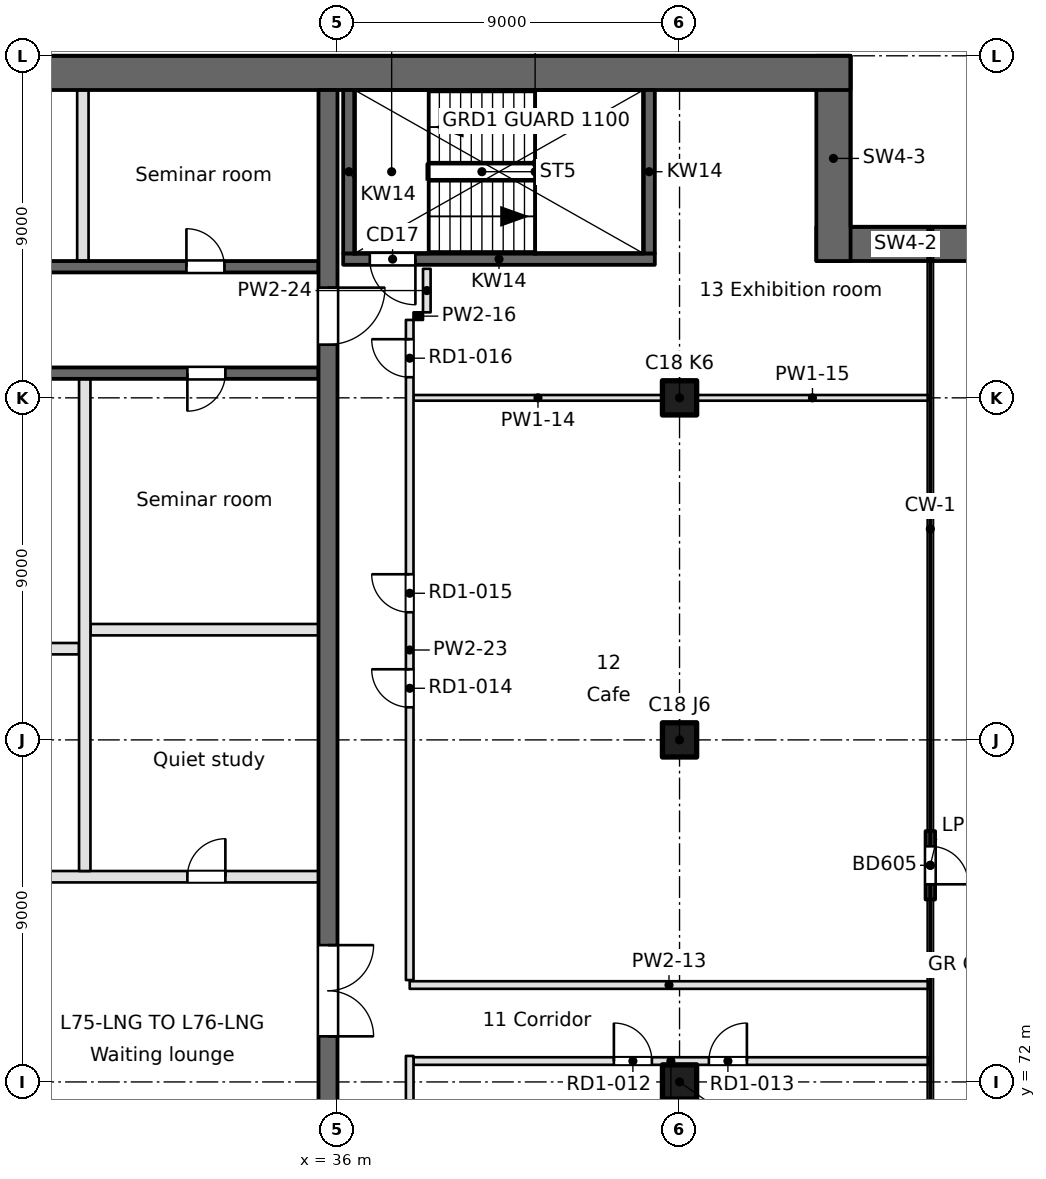
"""IFC4 building model, lengths in metres.
Left out: names, types, materials, properties, quantities, classifications, styles, units other than length and angle.
Written with IfcOpenShell. Run it as: python <this file> out.ifc"""

import sys

from ifc_helpers import new_model, si_unit, direction, frame, frame_2d, origin, origin_2d, place, context, subcontext, project, spatial, rectangle, extrude, element, fill, save


model = new_model("IFC4")
c1 = context("Model", 3, precision=1e-05, world=origin(), true_north=direction((0.0, 1.0)))
c2 = subcontext(c1, "Body", "Model", "MODEL_VIEW")
j1 = project(units=[si_unit("LENGTHUNIT", "METRE"), si_unit("PLANEANGLEUNIT", "RADIAN")], contexts=[c1])
p1 = place(None, origin())
s1 = spatial("IfcSite", under=j1, at=p1, CompositionType="ELEMENT")
p2 = place(p1, origin())
s2 = spatial("IfcBuilding", under=s1, at=p2, CompositionType="ELEMENT")
p3 = place(p2, frame((0.0, 0.0, 291.9)))
s3 = spatial("IfcBuildingStorey", under=s2, at=p3, CompositionType="ELEMENT", Elevation=291.9)
for number, where, z_axis, x_axis in (
    (1, (45.0, 72.0, 0.0), (0.0, 0.0, 1.0), (1.0, 0.0, 0.0)),
    (2, (45.0, 81.0, 0.0), (0.0, 0.0, 1.0), (1.0, 0.0, 0.0)),
    (3, (45.0, 90.0, 0.0), (0.0, 0.0, 1.0), (1.0, 0.0, 0.0)),
):
    element("IfcColumn", number, at=place(p3, frame(where, z_axis=z_axis, x_axis=x_axis)), inside=s3, PredefinedType="COLUMN", context=c2, shape_type="SweptSolid", body=[
        extrude(rectangle(XDim=0.9, YDim=0.9, at=origin_2d()), origin(), (0.0, 0.0, 1.0), 3.7),
    ])
p4 = place(p3, frame((53.3, 94.05, 0.0), z_axis=(0.0, 0.0, 1.0), x_axis=(-1.0, 0.0, 0.0)))
e4 = element("IfcWall", 4, at=p4, inside=s3, PredefinedType="SHEAR", context=c2, shape_type="SweptSolid", body=[
    extrude(rectangle(XDim=4.7, YDim=0.9, at=frame_2d((2.35, 0.0))), origin(), (0.0, 0.0, 1.0), 3.7),
])
p5 = place(p3, frame((49.05, 93.6, 0.0), z_axis=(0.0, 0.0, 1.0), x_axis=(0.0, 1.0, 0.0)))
e5 = element("IfcWall", 5, at=p5, inside=s3, PredefinedType="SHEAR", context=c2, shape_type="SweptSolid", body=[
    extrude(rectangle(XDim=5.4, YDim=0.9, at=frame_2d((2.7, 0.0))), origin(), (0.0, 0.0, 1.0), 3.7),
])
p6 = place(p3, frame((49.5, 98.55, 0.0), z_axis=(0.0, 0.0, 1.0), x_axis=(-1.0, 0.0, 0.0)))
e6 = element("IfcWall", 6, at=p6, inside=s3, PredefinedType="SHEAR", context=c2, shape_type="SweptSolid", body=[
    extrude(rectangle(XDim=45.0, YDim=0.9, at=frame_2d((22.5, 0.0))), origin(), (0.0, 0.0, 1.0), 3.7),
])
p7 = place(p3, frame((51.599, 76.801, 0.0), z_axis=(0.0, 0.0, 1.0), x_axis=(0.0, 1.0, 0.0)))
e7 = element("IfcWall", 7, at=p7, inside=s3, PredefinedType="SOLIDWALL", context=c2, shape_type="SweptSolid", body=[
    extrude(rectangle(XDim=1.8, YDim=0.25, at=frame_2d((0.9, 0.0))), origin(), (0.0, 0.0, 1.0), 3.3),
])
p8 = place(p7, frame((0.4, 0.0, 0.0)))
e8 = element("IfcOpeningElement", 8, at=p8, cuts=e7, PredefinedType="OPENING", context=c2, shape_type="SweptSolid", body=[
    extrude(rectangle(XDim=1.0, YDim=2.1, at=frame_2d((0.5, 1.05))), frame((0.0, 0.125, 0.0), z_axis=(0.0, -1.0, 0.0), x_axis=(1.0, 0.0, 0.0)), (0.0, 0.0, 1.0), 0.25),
])
p9 = place(p3, frame((22.35, 77.4, 0.0), z_axis=(0.0, 0.0, 1.0), x_axis=(1.0, 0.0, 0.0)))
e9 = element("IfcWall", 9, at=p9, inside=s3, PredefinedType="PARTITIONING", context=c2, shape_type="SweptSolid", body=[
    extrude(rectangle(XDim=13.15, YDim=0.3, at=frame_2d((6.575, 0.0))), origin(), (0.0, 0.0, 1.0), 3.3),
])
p10 = place(p9, frame((3.0, 0.0, 0.0)))
e10 = element("IfcOpeningElement", 10, at=p10, cuts=e9, PredefinedType="OPENING", context=c2, shape_type="SweptSolid", body=[
    extrude(rectangle(XDim=1.0, YDim=2.1, at=frame_2d((0.5, 1.05))), frame((0.0, 0.15, 0.0), z_axis=(0.0, -1.0, 0.0), x_axis=(1.0, 0.0, 0.0)), (0.0, 0.0, 1.0), 0.3),
])
p11 = place(p9, frame((9.7, 0.0, 0.0)))
e11 = element("IfcOpeningElement", 11, at=p11, cuts=e9, PredefinedType="OPENING", context=c2, shape_type="SweptSolid", body=[
    extrude(rectangle(XDim=1.0, YDim=2.1, at=frame_2d((0.5, 1.05))), frame((0.0, 0.15, 0.0), z_axis=(0.0, -1.0, 0.0), x_axis=(1.0, 0.0, 0.0)), (0.0, 0.0, 1.0), 0.3),
])
p12 = place(p3, frame((22.5, 83.4, 0.0), z_axis=(0.0, 0.0, 1.0), x_axis=(1.0, 0.0, 0.0)))
e12 = element("IfcWall", 12, at=p12, inside=s3, PredefinedType="PARTITIONING", context=c2, shape_type="SweptSolid", body=[
    extrude(rectangle(XDim=6.7, YDim=0.3, at=frame_2d((3.35, 0.0))), origin(), (0.0, 0.0, 1.0), 3.3),
])
p13 = place(p3, frame((29.5, 83.9, 0.0), z_axis=(0.0, 0.0, 1.0), x_axis=(1.0, 0.0, 0.0)))
e13 = element("IfcWall", 13, at=p13, inside=s3, PredefinedType="PARTITIONING", context=c2, shape_type="SweptSolid", body=[
    extrude(rectangle(XDim=6.0, YDim=0.3, at=frame_2d((3.0, 0.0))), origin(), (0.0, 0.0, 1.0), 3.3),
])
p14 = place(p3, frame((0.9, 90.65, -0.4), z_axis=(0.0, 0.0, 1.0), x_axis=(1.0, 0.0, 0.0)))
e14 = element("IfcWall", 14, at=p14, inside=s3, PredefinedType="SOLIDWALL", context=c2, shape_type="SweptSolid", body=[
    extrude(rectangle(XDim=34.6, YDim=0.3, at=frame_2d((17.3, 0.0))), origin(), (0.0, 0.0, 1.0), 3.7),
])
p15 = place(p14, frame((15.55, 0.0, 0.4)))
e15 = element("IfcOpeningElement", 15, at=p15, cuts=e14, PredefinedType="OPENING", context=c2, shape_type="SweptSolid", body=[
    extrude(rectangle(XDim=1.0, YDim=2.1, at=frame_2d((0.5, 1.05))), frame((0.0, 0.15, 0.0), z_axis=(0.0, -1.0, 0.0), x_axis=(1.0, 0.0, 0.0)), (0.0, 0.0, 1.0), 0.3),
])
p16 = place(p14, frame((2.35, 0.0, 0.4)))
e16 = element("IfcOpeningElement", 16, at=p16, cuts=e14, PredefinedType="OPENING", context=c2, shape_type="SweptSolid", body=[
    extrude(rectangle(XDim=1.0, YDim=2.1, at=frame_2d((0.5, 1.05))), frame((0.0, 0.15, 0.0), z_axis=(0.0, -1.0, 0.0), x_axis=(1.0, 0.0, 0.0)), (0.0, 0.0, 1.0), 0.3),
])
p17 = place(p14, frame((7.75, 0.0, 0.4)))
e17 = element("IfcOpeningElement", 17, at=p17, cuts=e14, PredefinedType="OPENING", context=c2, shape_type="SweptSolid", body=[
    extrude(rectangle(XDim=1.0, YDim=2.1, at=frame_2d((0.5, 1.05))), frame((0.0, 0.15, 0.0), z_axis=(0.0, -1.0, 0.0), x_axis=(1.0, 0.0, 0.0)), (0.0, 0.0, 1.0), 0.3),
])
p18 = place(p14, frame((24.45, 0.0, 0.4)))
e18 = element("IfcOpeningElement", 18, at=p18, cuts=e14, PredefinedType="OPENING", context=c2, shape_type="SweptSolid", body=[
    extrude(rectangle(XDim=1.0, YDim=2.1, at=frame_2d((0.5, 1.05))), frame((0.0, 0.15, 0.0), z_axis=(0.0, -1.0, 0.0), x_axis=(1.0, 0.0, 0.0)), (0.0, 0.0, 1.0), 0.3),
])
p19 = place(p14, frame((31.15, 0.0, 0.4)))
e19 = element("IfcOpeningElement", 19, at=p19, cuts=e14, PredefinedType="OPENING", context=c2, shape_type="SweptSolid", body=[
    extrude(rectangle(XDim=1.0, YDim=2.1, at=frame_2d((0.5, 1.05))), frame((0.0, 0.15, 0.0), z_axis=(0.0, -1.0, 0.0), x_axis=(1.0, 0.0, 0.0)), (0.0, 0.0, 1.0), 0.3),
])
p20 = place(p3, frame((0.9, 93.45, -0.4), z_axis=(0.0, 0.0, 1.0), x_axis=(1.0, 0.0, 0.0)))
e20 = element("IfcWall", 20, at=p20, inside=s3, PredefinedType="SOLIDWALL", context=c2, shape_type="SweptSolid", body=[
    extrude(rectangle(XDim=34.6, YDim=0.3, at=frame_2d((17.3, 0.0))), origin(), (0.0, 0.0, 1.0), 3.7),
])
p21 = place(p20, frame((9.7, 0.0, 0.4)))
e21 = element("IfcOpeningElement", 21, at=p21, cuts=e20, PredefinedType="OPENING", context=c2, shape_type="SweptSolid", body=[
    extrude(rectangle(XDim=1.2, YDim=2.1, at=frame_2d((0.6, 1.05))), frame((0.0, 0.15, 0.0), z_axis=(0.0, -1.0, 0.0), x_axis=(1.0, 0.0, 0.0)), (0.0, 0.0, 1.0), 0.3),
])
p22 = place(p20, frame((24.3, 0.0, 0.4)))
e22 = element("IfcOpeningElement", 22, at=p22, cuts=e20, PredefinedType="OPENING", context=c2, shape_type="SweptSolid", body=[
    extrude(rectangle(XDim=1.0, YDim=2.1, at=frame_2d((0.5, 1.05))), frame((0.0, 0.15, 0.0), z_axis=(0.0, -1.0, 0.0), x_axis=(1.0, 0.0, 0.0)), (0.0, 0.0, 1.0), 0.3),
])
p23 = place(p20, frame((31.125, 0.0, 0.4)))
e23 = element("IfcOpeningElement", 23, at=p23, cuts=e20, PredefinedType="OPENING", context=c2, shape_type="SweptSolid", body=[
    extrude(rectangle(XDim=1.0, YDim=2.1, at=frame_2d((0.5, 1.05))), frame((0.0, 0.15, 0.0), z_axis=(0.0, -1.0, 0.0), x_axis=(1.0, 0.0, 0.0)), (0.0, 0.0, 1.0), 0.3),
])
p24 = place(p3, frame((36.15, 93.65, -0.4), z_axis=(0.0, 0.0, 1.0), x_axis=(1.0, 0.0, 0.0)))
e24 = element("IfcWall", 24, at=p24, inside=s3, PredefinedType="SOLIDWALL", context=c2, shape_type="SweptSolid", body=[
    extrude(rectangle(XDim=8.2, YDim=0.3, at=frame_2d((4.1, 0.0))), origin(), (0.0, 0.0, 1.0), 3.7),
])
p25 = place(p24, frame((0.7, 0.0, 0.4)))
e25 = element("IfcOpeningElement", 25, at=p25, cuts=e24, PredefinedType="OPENING", context=c2, shape_type="SweptSolid", body=[
    extrude(rectangle(XDim=1.2, YDim=2.1, at=frame_2d((0.6, 1.05))), frame((0.0, 0.15, 0.0), z_axis=(0.0, -1.0, 0.0), x_axis=(1.0, 0.0, 0.0)), (0.0, 0.0, 1.0), 0.3),
])
p26 = place(p3, frame((29.3, 93.6, 0.0), z_axis=(0.0, 0.0, 1.0), x_axis=(0.0, 1.0, 0.0)))
e26 = element("IfcWall", 26, at=p26, inside=s3, PredefinedType="PARTITIONING", context=c2, shape_type="SweptSolid", body=[
    extrude(rectangle(XDim=4.5, YDim=0.3, at=frame_2d((2.25, 0.0))), origin(), (0.0, 0.0, 1.0), 3.3),
])
p27 = place(p3, frame((29.35, 77.55, 0.0), z_axis=(0.0, 0.0, 1.0), x_axis=(0.0, 1.0, 0.0)))
e27 = element("IfcWall", 27, at=p27, inside=s3, PredefinedType="PARTITIONING", context=c2, shape_type="SweptSolid", body=[
    extrude(rectangle(XDim=12.95, YDim=0.3, at=frame_2d((6.475, 0.0))), origin(), (0.0, 0.0, 1.0), 3.3),
])
p28 = place(p3, frame((35.75, 63.5, -0.4), z_axis=(0.0, 0.0, 1.0), x_axis=(0.0, 1.0, 0.0)))
e28 = element("IfcWall", 28, at=p28, inside=s3, PredefinedType="SOLIDWALL", context=c2, shape_type="SweptSolid", body=[
    extrude(rectangle(XDim=34.6, YDim=0.5, at=frame_2d((17.3, 0.0))), origin(), (0.0, 0.0, 1.0), 3.7),
])
p29 = place(p28, frame((9.7, 0.0, 0.4)))
e29 = element("IfcOpeningElement", 29, at=p29, cuts=e28, PredefinedType="OPENING", context=c2, shape_type="SweptSolid", body=[
    extrude(rectangle(XDim=2.4, YDim=2.1, at=frame_2d((1.2, 1.05))), frame((0.0, 0.25, 0.0), z_axis=(0.0, -1.0, 0.0), x_axis=(1.0, 0.0, 0.0)), (0.0, 0.0, 1.0), 0.5),
])
p30 = place(p28, frame((27.9, 0.0, 0.4)))
e30 = element("IfcOpeningElement", 30, at=p30, cuts=e28, PredefinedType="OPENING", context=c2, shape_type="SweptSolid", body=[
    extrude(rectangle(XDim=1.5, YDim=2.1, at=frame_2d((0.75, 1.05))), frame((0.0, 0.25, 0.0), z_axis=(0.0, -1.0, 0.0), x_axis=(1.0, 0.0, 0.0)), (0.0, 0.0, 1.0), 0.5),
])
p31 = place(p28, frame((1.5, 0.0, 0.4)))
e31 = element("IfcOpeningElement", 31, at=p31, cuts=e28, PredefinedType="OPENING", context=c2, shape_type="SweptSolid", body=[
    extrude(rectangle(XDim=1.2, YDim=2.1, at=frame_2d((0.6, 1.05))), frame((0.0, 0.25, 0.0), z_axis=(0.0, -1.0, 0.0), x_axis=(1.0, 0.0, 0.0)), (0.0, 0.0, 1.0), 0.5),
])
for number, where, z_axis, x_axis in (
    (32, (36.3, 93.8, -0.4), (0.0, 0.0, 1.0), (0.0, 1.0, 0.0)),
    (33, (44.2, 93.8, -0.4), (0.0, 0.0, 1.0), (0.0, 1.0, 0.0)),
):
    element("IfcWall", number, at=place(p3, frame(where, z_axis=z_axis, x_axis=x_axis)), inside=s3, PredefinedType="SOLIDWALL", context=c2, shape_type="SweptSolid", body=[
        extrude(rectangle(XDim=4.3, YDim=0.3, at=frame_2d((2.15, 0.0))), origin(), (0.0, 0.0, 1.0), 3.7),
    ])
p32 = place(p3, frame((51.545, 72.55, 0.0), z_axis=(0.0, 0.0, 1.0), x_axis=(-1.0, 0.0, 0.0)))
e34 = element("IfcWall", 34, at=p32, inside=s3, PredefinedType="PARTITIONING", context=c2, shape_type="SweptSolid", body=[
    extrude(rectangle(XDim=13.545, YDim=0.2, at=frame_2d((6.772, 0.0))), origin(), (0.0, 0.0, 1.0), 3.3),
])
p33 = place(p32, frame((7.272, 0.0, 0.0)))
e35 = element("IfcOpeningElement", 35, at=p33, cuts=e34, PredefinedType="OPENING", context=c2, shape_type="SweptSolid", body=[
    extrude(rectangle(XDim=1.0, YDim=2.1, at=frame_2d((0.5, 1.05))), frame((0.0, 0.1, 0.0), z_axis=(0.0, -1.0, 0.0), x_axis=(1.0, 0.0, 0.0)), (0.0, 0.0, 1.0), 0.2),
])
p34 = place(p32, frame((4.772, 0.0, 0.0)))
e36 = element("IfcOpeningElement", 36, at=p34, cuts=e34, PredefinedType="OPENING", context=c2, shape_type="SweptSolid", body=[
    extrude(rectangle(XDim=1.0, YDim=2.1, at=frame_2d((0.5, 1.05))), frame((0.0, 0.1, 0.0), z_axis=(0.0, -1.0, 0.0), x_axis=(1.0, 0.0, 0.0)), (0.0, 0.0, 1.0), 0.2),
])
p35 = place(p3, frame((37.9, 74.55, 0.0), z_axis=(0.0, 0.0, 1.0), x_axis=(1.0, 0.0, 0.0)))
e37 = element("IfcWall", 37, at=p35, inside=s3, PredefinedType="PARTITIONING", context=c2, shape_type="SweptSolid", body=[
    extrude(rectangle(XDim=13.645, YDim=0.2, at=frame_2d((6.823, 0.0))), origin(), (0.0, 0.0, 1.0), 3.3),
])
p36 = place(p3, frame((38.0, 90.0, 0.0), z_axis=(0.0, 0.0, 1.0), x_axis=(1.0, 0.0, 0.0)))
e38 = element("IfcWall", 38, at=p36, inside=s3, PredefinedType="PARTITIONING", context=c2, shape_type="SweptSolid", body=[
    extrude(rectangle(XDim=6.55, YDim=0.15, at=frame_2d((3.275, 0.0))), origin(), (0.0, 0.0, 1.0), 3.3),
])
p37 = place(p3, frame((45.45, 90.0, 0.0), z_axis=(0.0, 0.0, 1.0), x_axis=(1.0, 0.0, 0.0)))
e39 = element("IfcWall", 39, at=p37, inside=s3, PredefinedType="PARTITIONING", context=c2, shape_type="SweptSolid", body=[
    extrude(rectangle(XDim=6.095, YDim=0.15, at=frame_2d((3.047, 0.0))), origin(), (0.0, 0.0, 1.0), 3.3),
])
p38 = place(p3, frame((38.25, 92.15, 0.0), z_axis=(0.0, 0.0, 1.0), x_axis=(-1.0, 0.0, 0.0)))
e40 = element("IfcWall", 40, at=p38, inside=s3, PredefinedType="PARTITIONING", context=c2, shape_type="SweptSolid", body=[
    extrude(rectangle(XDim=0.25, YDim=0.2, at=frame_2d((0.125, 0.0))), origin(), (0.0, 0.0, 1.0), 3.3),
])
p39 = place(p3, frame((37.9, 72.684, 0.0), z_axis=(0.0, 0.0, 1.0), x_axis=(0.0, -1.0, 0.0)))
e41 = element("IfcWall", 41, at=p39, inside=s3, PredefinedType="PARTITIONING", context=c2, shape_type="SweptSolid", body=[
    extrude(rectangle(XDim=8.884, YDim=0.2, at=frame_2d((4.442, 0.0))), origin(), (0.0, 0.0, 1.0), 3.3),
])
p40 = place(p3, frame((37.9, 92.05, 0.0), z_axis=(0.0, 0.0, 1.0), x_axis=(0.0, -1.0, 0.0)))
e42 = element("IfcWall", 42, at=p40, inside=s3, PredefinedType="PARTITIONING", context=c2, shape_type="SweptSolid", body=[
    extrude(rectangle(XDim=17.369, YDim=0.2, at=frame_2d((8.685, 0.0))), origin(), (0.0, 0.0, 1.0), 3.3),
])
p41 = place(p40, frame((9.192, 0.0, 0.0)))
e43 = element("IfcOpeningElement", 43, at=p41, cuts=e42, PredefinedType="OPENING", context=c2, shape_type="SweptSolid", body=[
    extrude(rectangle(XDim=1.0, YDim=2.1, at=frame_2d((0.5, 1.05))), frame((0.0, 0.1, 0.0), z_axis=(0.0, -1.0, 0.0), x_axis=(1.0, 0.0, 0.0)), (0.0, 0.0, 1.0), 0.2),
])
p42 = place(p40, frame((6.692, 0.0, 0.0)))
e44 = element("IfcOpeningElement", 44, at=p42, cuts=e42, PredefinedType="OPENING", context=c2, shape_type="SweptSolid", body=[
    extrude(rectangle(XDim=1.0, YDim=2.1, at=frame_2d((0.5, 1.05))), frame((0.0, 0.1, 0.0), z_axis=(0.0, -1.0, 0.0), x_axis=(1.0, 0.0, 0.0)), (0.0, 0.0, 1.0), 0.2),
])
p43 = place(p40, frame((0.507, 0.0, 0.0)))
e45 = element("IfcOpeningElement", 45, at=p43, cuts=e42, PredefinedType="OPENING", context=c2, shape_type="SweptSolid", body=[
    extrude(rectangle(XDim=1.0, YDim=2.1, at=frame_2d((0.5, 1.05))), frame((0.0, 0.1, 0.0), z_axis=(0.0, -1.0, 0.0), x_axis=(1.0, 0.0, 0.0)), (0.0, 0.0, 1.0), 0.2),
])
p44 = place(p3, frame((38.35, 93.396, 0.0), z_axis=(0.0, 0.0, 1.0), x_axis=(0.0, -1.0, 0.0)))
e46 = element("IfcWall", 46, at=p44, inside=s3, PredefinedType="PARTITIONING", context=c2, shape_type="SweptSolid", body=[
    extrude(rectangle(XDim=1.146, YDim=0.2, at=frame_2d((0.573, 0.0))), origin(), (0.0, 0.0, 1.0), 3.3),
])
p45 = place(p8, frame((1.0, 0.0, 0.0), z_axis=(0.0, 0.0, 1.0), x_axis=(-1.0, 0.0, 0.0)))
e47 = element("IfcDoor", 47, at=p45, inside=s3, OperationType="SINGLE_SWING_RIGHT", PredefinedType="DOOR", context=c2, shape_type="SweptSolid", body=[
    extrude(rectangle(XDim=1.0, YDim=2.1, at=frame_2d((0.5, 1.05))), frame((0.0, 0.025, 0.0), z_axis=(0.0, -1.0, 0.0), x_axis=(1.0, 0.0, 0.0)), (0.0, 0.0, 1.0), 0.05),
])
fill(e8, e47)
p46 = place(p29, frame((2.4, 0.0, 0.0), z_axis=(0.0, 0.0, 1.0), x_axis=(-1.0, 0.0, 0.0)))
e48 = element("IfcDoor", 48, at=p46, inside=s3, OperationType="DOUBLE_DOOR_SINGLE_SWING", PredefinedType="DOOR", context=c2, shape_type="SweptSolid", body=[
    extrude(rectangle(XDim=2.4, YDim=2.1, at=frame_2d((1.2, 1.05))), frame((0.0, 0.025, 0.0), z_axis=(0.0, -1.0, 0.0), x_axis=(1.0, 0.0, 0.0)), (0.0, 0.0, 1.0), 0.05),
])
fill(e29, e48)
p47 = place(p30, frame((1.5, 0.0, 0.0), z_axis=(0.0, 0.0, 1.0), x_axis=(-1.0, 0.0, 0.0)))
e49 = element("IfcDoor", 49, at=p47, inside=s3, OperationType="SINGLE_SWING_LEFT", PredefinedType="DOOR", context=c2, shape_type="SweptSolid", body=[
    extrude(rectangle(XDim=1.5, YDim=2.1, at=frame_2d((0.75, 1.05))), frame((0.0, 0.025, 0.0), z_axis=(0.0, -1.0, 0.0), x_axis=(1.0, 0.0, 0.0)), (0.0, 0.0, 1.0), 0.05),
])
fill(e30, e49)
p48 = place(p25, frame((1.2, 0.0, 0.0), z_axis=(0.0, 0.0, 1.0), x_axis=(-1.0, 0.0, 0.0)))
e50 = element("IfcDoor", 50, at=p48, inside=s3, OperationType="SINGLE_SWING_LEFT", PredefinedType="DOOR", context=c2, shape_type="SweptSolid", body=[
    extrude(rectangle(XDim=1.2, YDim=2.1, at=frame_2d((0.6, 1.05))), frame((0.0, 0.025, 0.0), z_axis=(0.0, -1.0, 0.0), x_axis=(1.0, 0.0, 0.0)), (0.0, 0.0, 1.0), 0.05),
])
fill(e25, e50)
p49 = place(p11, origin())
e51 = element("IfcDoor", 51, at=p49, inside=s3, OperationType="SINGLE_SWING_RIGHT", PredefinedType="DOOR", context=c2, shape_type="SweptSolid", body=[
    extrude(rectangle(XDim=1.0, YDim=2.1, at=frame_2d((0.5, 1.05))), frame((0.0, 0.025, 0.0), z_axis=(0.0, -1.0, 0.0), x_axis=(1.0, 0.0, 0.0)), (0.0, 0.0, 1.0), 0.05),
])
fill(e11, e51)
p50 = place(p19, frame((1.0, 0.0, 0.0), z_axis=(0.0, 0.0, 1.0), x_axis=(-1.0, 0.0, 0.0)))
e52 = element("IfcDoor", 52, at=p50, inside=s3, OperationType="SINGLE_SWING_RIGHT", PredefinedType="DOOR", context=c2, shape_type="SweptSolid", body=[
    extrude(rectangle(XDim=1.0, YDim=2.1, at=frame_2d((0.5, 1.05))), frame((0.0, 0.025, 0.0), z_axis=(0.0, -1.0, 0.0), x_axis=(1.0, 0.0, 0.0)), (0.0, 0.0, 1.0), 0.05),
])
fill(e19, e52)
p51 = place(p23, origin())
e53 = element("IfcDoor", 53, at=p51, inside=s3, OperationType="SINGLE_SWING_LEFT", PredefinedType="DOOR", context=c2, shape_type="SweptSolid", body=[
    extrude(rectangle(XDim=1.0, YDim=2.1, at=frame_2d((0.5, 1.05))), frame((0.0, 0.025, 0.0), z_axis=(0.0, -1.0, 0.0), x_axis=(1.0, 0.0, 0.0)), (0.0, 0.0, 1.0), 0.05),
])
fill(e23, e53)
p52 = place(p33, frame((1.0, 0.0, 0.0), z_axis=(0.0, 0.0, 1.0), x_axis=(-1.0, 0.0, 0.0)))
e54 = element("IfcDoor", 54, at=p52, inside=s3, OperationType="SINGLE_SWING_LEFT", PredefinedType="DOOR", context=c2, shape_type="SweptSolid", body=[
    extrude(rectangle(XDim=1.0, YDim=2.1, at=frame_2d((0.5, 1.05))), frame((0.0, 0.025, 0.0), z_axis=(0.0, -1.0, 0.0), x_axis=(1.0, 0.0, 0.0)), (0.0, 0.0, 1.0), 0.05),
])
fill(e35, e54)
p53 = place(p34, frame((1.0, 0.0, 0.0), z_axis=(0.0, 0.0, 1.0), x_axis=(-1.0, 0.0, 0.0)))
e55 = element("IfcDoor", 55, at=p53, inside=s3, OperationType="SINGLE_SWING_RIGHT", PredefinedType="DOOR", context=c2, shape_type="SweptSolid", body=[
    extrude(rectangle(XDim=1.0, YDim=2.1, at=frame_2d((0.5, 1.05))), frame((0.0, 0.025, 0.0), z_axis=(0.0, -1.0, 0.0), x_axis=(1.0, 0.0, 0.0)), (0.0, 0.0, 1.0), 0.05),
])
fill(e36, e55)
p54 = place(p41, frame((1.0, 0.0, 0.0), z_axis=(0.0, 0.0, 1.0), x_axis=(-1.0, 0.0, 0.0)))
e56 = element("IfcDoor", 56, at=p54, inside=s3, OperationType="SINGLE_SWING_RIGHT", PredefinedType="DOOR", context=c2, shape_type="SweptSolid", body=[
    extrude(rectangle(XDim=1.0, YDim=2.1, at=frame_2d((0.5, 1.05))), frame((0.0, 0.025, 0.0), z_axis=(0.0, -1.0, 0.0), x_axis=(1.0, 0.0, 0.0)), (0.0, 0.0, 1.0), 0.05),
])
fill(e43, e56)
p55 = place(p42, frame((1.0, 0.0, 0.0), z_axis=(0.0, 0.0, 1.0), x_axis=(-1.0, 0.0, 0.0)))
e57 = element("IfcDoor", 57, at=p55, inside=s3, OperationType="SINGLE_SWING_RIGHT", PredefinedType="DOOR", context=c2, shape_type="SweptSolid", body=[
    extrude(rectangle(XDim=1.0, YDim=2.1, at=frame_2d((0.5, 1.05))), frame((0.0, 0.025, 0.0), z_axis=(0.0, -1.0, 0.0), x_axis=(1.0, 0.0, 0.0)), (0.0, 0.0, 1.0), 0.05),
])
fill(e44, e57)
p56 = place(p43, frame((1.0, 0.0, 0.0), z_axis=(0.0, 0.0, 1.0), x_axis=(-1.0, 0.0, 0.0)))
e58 = element("IfcDoor", 58, at=p56, inside=s3, OperationType="SINGLE_SWING_RIGHT", PredefinedType="DOOR", context=c2, shape_type="SweptSolid", body=[
    extrude(rectangle(XDim=1.0, YDim=2.1, at=frame_2d((0.5, 1.05))), frame((0.0, 0.025, 0.0), z_axis=(0.0, -1.0, 0.0), x_axis=(1.0, 0.0, 0.0)), (0.0, 0.0, 1.0), 0.05),
])
fill(e45, e58)
save(model, sys.argv[1])
